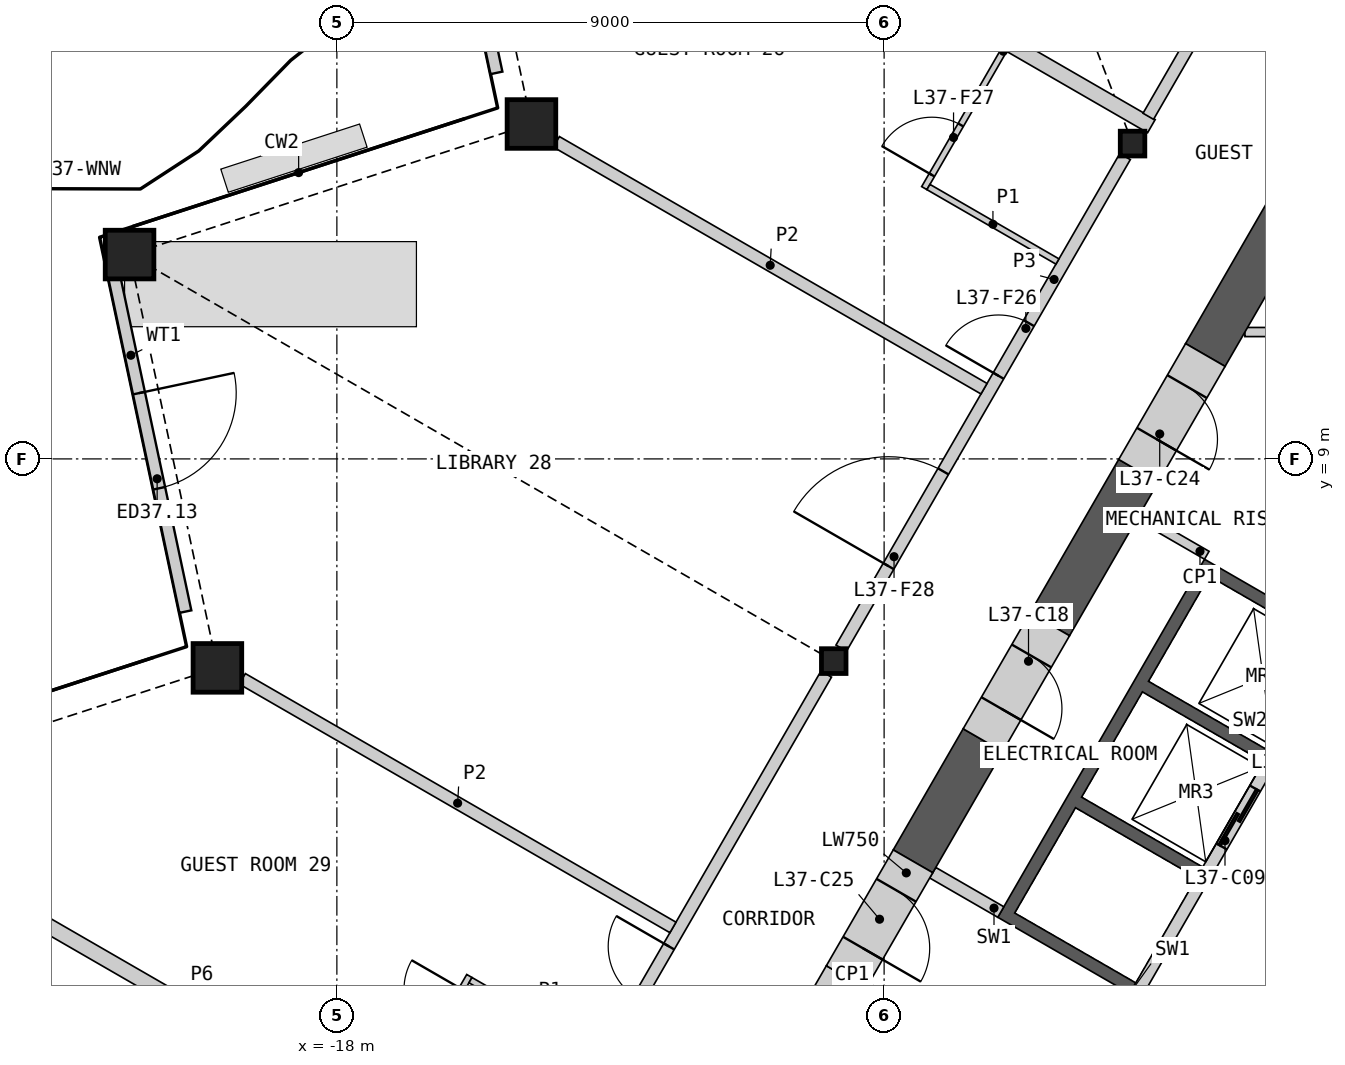
"""IFC4 building model, lengths in metres.
Left out: names, types, materials, properties, quantities, classifications, styles, units other than length and angle.
Written with IfcOpenShell. Run it as: python <this file> out.ifc"""

import sys

from ifc_helpers import new_model, si_unit, direction, frame, frame_2d, origin, origin_2d, place, context, subcontext, project, spatial, polyline, rectangle, hollow_rectangle, i_section, outline, extrude, element, fill, save


model = new_model("IFC4")
c1 = context("Model", 3, precision=1e-05, world=origin(), true_north=direction((0.0, 1.0)))
c2 = subcontext(c1, "Body", "Model", "MODEL_VIEW")
j1 = project(units=[si_unit("LENGTHUNIT", "METRE"), si_unit("PLANEANGLEUNIT", "RADIAN")], contexts=[c1])
p1 = place(None, origin())
s1 = spatial("IfcSite", under=j1, at=p1, CompositionType="ELEMENT")
p2 = place(p1, origin())
s2 = spatial("IfcBuilding", under=s1, at=p2, CompositionType="ELEMENT")
p3 = place(p2, frame((0.0, 0.0, 176.4)))
s3 = spatial("IfcBuildingStorey", under=s2, at=p3, CompositionType="ELEMENT", Elevation=176.4)
for number, where, z_axis, x_axis in (
    (1, (-14.8, 14.508, 0.0), (0.0, 0.0, 1.0), (1.0, 0.0, 0.0)),
    (2, (-21.409, 12.361, 0.0), (0.0, 0.0, 1.0), (1.0, 0.0, 0.0)),
    (3, (-19.965, 5.563, 0.0), (0.0, 0.0, 1.0), (1.0, 0.0, 0.0)),
):
    element("IfcColumn", number, at=place(p3, frame(where, z_axis=z_axis, x_axis=x_axis)), inside=s3, PredefinedType="COLUMN", context=c2, shape_type="SweptSolid", body=[
        extrude(hollow_rectangle(XDim=0.8, YDim=0.8, WallThickness=0.05, at=origin_2d()), origin(), (0.0, 0.0, 1.0), 3.6),
    ])
for number, where, z_axis, x_axis in (
    (4, (-4.914, 14.186, 0.0), (0.0, 0.0, 1.0), (1.0, 0.0, 0.0)),
    (5, (-9.828, 5.675, 0.0), (0.0, 0.0, 1.0), (1.0, 0.0, 0.0)),
):
    element("IfcColumn", number, at=place(p3, frame(where, z_axis=z_axis, x_axis=x_axis)), inside=s3, PredefinedType="COLUMN", context=c2, shape_type="SweptSolid", body=[
        extrude(i_section(OverallWidth=0.404, OverallDepth=0.407, WebThickness=0.027, FlangeThickness=0.044, at=origin_2d()), origin(), (0.0, 0.0, 1.0), 3.6),
    ])
p4 = place(p3, frame((-16.571, 20.971, 0.0), z_axis=(0.0, 0.0, 1.0), x_axis=(0.207872471739, -0.978155936184, 0.0)))
e6 = element("IfcWall", 6, at=p4, inside=s3, PredefinedType="SOLIDWALL", context=c2, shape_type="SweptSolid", body=[
    extrude(rectangle(XDim=5.748, YDim=0.2, at=frame_2d((2.874, 0.0))), origin(), (0.0, 0.0, 1.0), 2.701),
])
p5 = place(p4, frame((2.074, 0.0, 0.0)))
e7 = element("IfcOpeningElement", 7, at=p5, cuts=e6, PredefinedType="OPENING", context=c2, shape_type="SweptSolid", body=[
    extrude(rectangle(XDim=1.6, YDim=2.4, at=frame_2d((0.8, 1.2))), frame((0.0, 0.11, 0.0), z_axis=(0.0, -1.0, 0.0), x_axis=(1.0, 0.0, 0.0)), (0.0, 0.0, 1.0), 0.22),
])
p6 = place(p3, frame((-21.686, 12.111, 0.0), z_axis=(0.0, 0.0, 1.0), x_axis=(0.207872471739, -0.978155936184, 0.0)))
e8 = element("IfcWall", 8, at=p6, inside=s3, PredefinedType="SOLIDWALL", context=c2, shape_type="SweptSolid", body=[
    extrude(rectangle(XDim=5.748, YDim=0.2, at=frame_2d((2.874, 0.0))), origin(), (0.0, 0.0, 1.0), 2.701),
])
p7 = place(p6, frame((2.074, 0.0, 0.0)))
e9 = element("IfcOpeningElement", 9, at=p7, cuts=e8, PredefinedType="OPENING", context=c2, shape_type="SweptSolid", body=[
    extrude(rectangle(XDim=1.6, YDim=2.4, at=frame_2d((0.8, 1.2))), frame((0.0, 0.11, 0.0), z_axis=(0.0, -1.0, 0.0), x_axis=(1.0, 0.0, 0.0)), (0.0, 0.0, 1.0), 0.22),
])
p8 = place(p3, origin())
e10 = element("IfcWall", 10, at=p8, inside=s3, PredefinedType="SHEAR", context=c2, shape_type="SweptSolid", body=[
    extrude(outline(polyline([(-4.96, 0.208), (-7.131, 1.461), (-3.731, 7.35), (-1.561, 6.097), (-1.66, 5.924), (-3.652, 7.074), (-4.652, 5.342), (-2.66, 4.192), (-2.76, 4.019), (-4.752, 5.169), (-5.752, 3.437), (-3.76, 2.287), (-3.861, 2.113), (-5.852, 3.263), (-6.852, 1.531), (-4.861, 0.381), (-4.96, 0.208)])), origin(), (0.0, 0.0, 1.0), 3.25),
])
p9 = place(p3, frame((-1.631, 5.776, 0.0), z_axis=(0.0, 0.0, 1.0), x_axis=(-0.499992876559, -0.866029516466, 0.0)))
e11 = element("IfcWall", 11, at=p9, inside=s3, PredefinedType="SOLIDWALL", context=c2, shape_type="SweptSolid", body=[
    extrude(rectangle(XDim=6.486, YDim=0.2, at=frame_2d((3.243, 0.0))), origin(), (0.0, 0.0, 1.0), 3.25),
])
p10 = place(p9, frame((0.337, 0.0, 0.0)))
e12 = element("IfcOpeningElement", 12, at=p10, cuts=e11, PredefinedType="OPENING", context=c2, shape_type="SweptSolid", body=[
    extrude(rectangle(XDim=1.1, YDim=2.1, at=frame_2d((0.55, 1.05))), frame((0.0, 0.11, 0.0), z_axis=(0.0, -1.0, 0.0), x_axis=(1.0, 0.0, 0.0)), (0.0, 0.0, 1.0), 0.22),
])
p11 = place(p9, frame((2.537, 0.0, 0.0)))
e13 = element("IfcOpeningElement", 13, at=p11, cuts=e11, PredefinedType="OPENING", context=c2, shape_type="SweptSolid", body=[
    extrude(rectangle(XDim=1.1, YDim=2.1, at=frame_2d((0.55, 1.05))), frame((0.0, 0.11, 0.0), z_axis=(0.0, -1.0, 0.0), x_axis=(1.0, 0.0, 0.0)), (0.0, 0.0, 1.0), 0.22),
])
for number, where, z_axis, x_axis in (
    (14, (-7.081, 1.548, 0.0), (0.0, 0.0, 1.0), (-0.866, 0.5, 0.0)),
    (15, (-8.181, -0.357, 0.0), (0.0, 0.0, 1.0), (-0.866, 0.5, 0.0)),
):
    element("IfcWall", number, at=place(p3, frame(where, z_axis=z_axis, x_axis=x_axis)), inside=s3, PredefinedType="SHEAR", context=c2, shape_type="SweptSolid", body=[
        extrude(rectangle(XDim=1.293, YDim=0.2, at=frame_2d((0.646, 0.0))), origin(), (0.0, 0.0, 1.0), 3.25),
    ])
p12 = place(p3, frame((-3.693, 7.415, 0.0), z_axis=(0.0, 0.0, 1.0), x_axis=(-0.866003189247, 0.500038474733, 0.0)))
e16 = element("IfcWall", 16, at=p12, inside=s3, PredefinedType="PARTITIONING", context=c2, shape_type="SweptSolid", body=[
    extrude(rectangle(XDim=1.293, YDim=0.15, at=frame_2d((0.646, 0.0))), origin(), (0.0, 0.0, 1.0), 3.25),
])
p13 = place(p3, frame((-1.544, 11.087, 0.0), z_axis=(0.0, 0.0, 1.0), x_axis=(-1.0, 0.0, 0.0)))
e17 = element("IfcWall", 17, at=p13, inside=s3, PredefinedType="PARTITIONING", context=c2, shape_type="SweptSolid", body=[
    extrude(rectangle(XDim=1.522, YDim=0.15, at=frame_2d((0.761, 0.0))), origin(), (0.0, 0.0, 1.0), 3.25),
])
p14 = place(p3, frame((-0.325, 16.585, 0.0), z_axis=(0.0, 0.0, 1.0), x_axis=(-0.499993425452, -0.866029199568, 0.0)))
e18 = element("IfcWall", 18, at=p14, inside=s3, PredefinedType="SHEAR", context=c2, shape_type="SweptSolid", body=[
    extrude(rectangle(XDim=6.785, YDim=0.75, at=frame_2d((3.393, 0.0))), origin(), (0.0, 0.0, 1.0), 3.25),
])
p15 = place(p3, frame((-4.817, 8.804, 0.0), z_axis=(0.0, 0.0, 1.0), x_axis=(-0.500029273391, -0.866008502124, 0.0)))
e19 = element("IfcWall", 19, at=p15, inside=s3, PredefinedType="SHEAR", context=c2, shape_type="SweptSolid", body=[
    extrude(rectangle(XDim=2.916, YDim=0.75, at=frame_2d((1.458, 0.0))), origin(), (0.0, 0.0, 1.0), 3.25),
])
p16 = place(p3, frame((-7.375, 4.374, 0.0), z_axis=(0.0, 0.0, 1.0), x_axis=(-0.499952165731, -0.866053019151, 0.0)))
e20 = element("IfcWall", 20, at=p16, inside=s3, PredefinedType="SHEAR", context=c2, shape_type="SweptSolid", body=[
    extrude(rectangle(XDim=2.3, YDim=0.75, at=frame_2d((1.15, 0.0))), origin(), (0.0, 0.0, 1.0), 3.25),
])
p17 = place(p3, frame((-6.275, 6.279, 0.0), z_axis=(0.0, 0.0, 1.0), x_axis=(-0.499946605688, -0.86605622881, 0.0)))
e21 = element("IfcWall", 21, at=p17, inside=s3, PredefinedType="SHEAR", context=c2, shape_type="SweptSolid", body=[
    extrude(rectangle(XDim=2.2, YDim=0.75, at=frame_2d((1.1, 0.0))), origin(), (0.0, 0.0, 1.0), 3.25),
])
p18 = place(p17, frame((0.6, 0.0, 0.0)))
e22 = element("IfcOpeningElement", 22, at=p18, cuts=e21, PredefinedType="OPENING", context=c2, shape_type="SweptSolid", body=[
    extrude(rectangle(XDim=1.0, YDim=2.1, at=frame_2d((0.5, 1.05))), frame((0.0, 0.385, 0.0), z_axis=(0.0, -1.0, 0.0), x_axis=(1.0, 0.0, 0.0)), (0.0, 0.0, 1.0), 0.77),
])
p19 = place(p3, frame((-9.625, 0.477, 0.0), z_axis=(0.0, 0.0, 1.0), x_axis=(-0.499995718215, -0.86602787586, 0.0)))
e23 = element("IfcWall", 23, at=p19, inside=s3, PredefinedType="SHEAR", context=c2, shape_type="SweptSolid", body=[
    extrude(rectangle(XDim=3.016, YDim=0.75, at=frame_2d((1.508, 0.0))), origin(), (0.0, 0.0, 1.0), 3.25),
])
p20 = place(p19, frame((1.4, 0.0, 0.0)))
e24 = element("IfcOpeningElement", 24, at=p20, cuts=e23, PredefinedType="OPENING", context=c2, shape_type="SweptSolid", body=[
    extrude(rectangle(XDim=1.0, YDim=2.1, at=frame_2d((0.5, 1.05))), frame((0.0, 0.385, 0.0), z_axis=(0.0, -1.0, 0.0), x_axis=(1.0, 0.0, 0.0)), (0.0, 0.0, 1.0), 0.77),
])
p21 = place(p3, frame((-3.717, 10.709, 0.0), z_axis=(0.0, 0.0, 1.0), x_axis=(-0.50002983664, -0.866008176907, 0.0)))
e25 = element("IfcWall", 25, at=p21, inside=s3, PredefinedType="SHEAR", context=c2, shape_type="SweptSolid", body=[
    extrude(rectangle(XDim=2.2, YDim=0.75, at=frame_2d((1.1, 0.0))), origin(), (0.0, 0.0, 1.0), 3.25),
])
p22 = place(p21, frame((0.6, 0.0, 0.0)))
e26 = element("IfcOpeningElement", 26, at=p22, cuts=e25, PredefinedType="OPENING", context=c2, shape_type="SweptSolid", body=[
    extrude(rectangle(XDim=1.0, YDim=2.1, at=frame_2d((0.5, 1.05))), frame((0.0, 0.385, 0.0), z_axis=(0.0, -1.0, 0.0), x_axis=(1.0, 0.0, 0.0)), (0.0, 0.0, 1.0), 0.77),
])
p23 = place(p3, frame((-8.525, 2.382, 0.0), z_axis=(0.0, 0.0, 1.0), x_axis=(-0.500077893725, -0.86598042715, 0.0)))
e27 = element("IfcWall", 27, at=p23, inside=s3, PredefinedType="SHEAR", context=c2, shape_type="SweptSolid", body=[
    extrude(rectangle(XDim=2.2, YDim=0.75, at=frame_2d((1.1, 0.0))), origin(), (0.0, 0.0, 1.0), 3.25),
])
p24 = place(p23, frame((0.55, 0.0, 0.0)))
e28 = element("IfcOpeningElement", 28, at=p24, cuts=e27, PredefinedType="OPENING", context=c2, shape_type="SweptSolid", body=[
    extrude(rectangle(XDim=1.1, YDim=2.1, at=frame_2d((0.55, 1.05))), frame((0.0, 0.385, 0.0), z_axis=(0.0, -1.0, 0.0), x_axis=(1.0, 0.0, 0.0)), (0.0, 0.0, 1.0), 0.77),
])
p25 = place(p3, frame((-26.164, 3.292, 0.0), z_axis=(0.0, 0.0, 1.0), x_axis=(0.866022412254, -0.500005181446, 0.0)))
e29 = element("IfcWall", 29, at=p25, inside=s3, PredefinedType="PARTITIONING", context=c2, shape_type="SweptSolid", body=[
    extrude(rectangle(XDim=13.081, YDim=0.25, at=frame_2d((6.541, 0.0))), origin(), (0.0, 0.0, 1.0), 2.404),
])
p26 = place(p3, frame((-15.835, 20.956, 0.0), z_axis=(0.0, 0.0, 1.0), x_axis=(0.866029765546, -0.499992445131, 0.0)))
e30 = element("IfcWall", 30, at=p26, inside=s3, PredefinedType="PARTITIONING", context=c2, shape_type="SweptSolid", body=[
    extrude(rectangle(XDim=12.968, YDim=0.25, at=frame_2d((6.484, 0.0))), origin(), (0.0, 0.0, 1.0), 2.404),
])
p27 = place(p3, frame((-9.705, 5.888, 0.0), z_axis=(0.0, 0.0, 1.0), x_axis=(0.50000393355, 0.866023132736, 0.0)))
e31 = element("IfcWall", 31, at=p27, inside=s3, PredefinedType="PARTITIONING", context=c2, shape_type="SweptSolid", body=[
    extrude(rectangle(XDim=9.335, YDim=0.2, at=frame_2d((4.667, 0.0))), origin(), (0.0, 0.0, 1.0), 3.25),
])
p28 = place(p27, frame((5.172, 0.0, 0.0)))
e32 = element("IfcOpeningElement", 32, at=p28, cuts=e31, PredefinedType="OPENING", context=c2, shape_type="SweptSolid", body=[
    extrude(rectangle(XDim=1.0, YDim=2.1, at=frame_2d((0.5, 1.05))), frame((0.0, 0.11, 0.0), z_axis=(0.0, -1.0, 0.0), x_axis=(1.0, 0.0, 0.0)), (0.0, 0.0, 1.0), 0.22),
])
p29 = place(p27, frame((1.556, 0.0, 0.0)))
e33 = element("IfcOpeningElement", 33, at=p29, cuts=e31, PredefinedType="OPENING", context=c2, shape_type="SweptSolid", body=[
    extrude(rectangle(XDim=1.8, YDim=2.1, at=frame_2d((0.9, 1.05))), frame((0.0, 0.11, 0.0), z_axis=(0.0, -1.0, 0.0), x_axis=(1.0, 0.0, 0.0)), (0.0, 0.0, 1.0), 0.22),
])
p30 = place(p3, frame((-14.619, -2.624, 0.0), z_axis=(0.0, 0.0, 1.0), x_axis=(0.50000393355, 0.866023132736, 0.0)))
e34 = element("IfcWall", 34, at=p30, inside=s3, PredefinedType="PARTITIONING", context=c2, shape_type="SweptSolid", body=[
    extrude(rectangle(XDim=9.335, YDim=0.2, at=frame_2d((4.667, 0.0))), origin(), (0.0, 0.0, 1.0), 3.25),
])
p31 = place(p30, frame((3.163, 0.0, 0.0)))
e35 = element("IfcOpeningElement", 35, at=p31, cuts=e34, PredefinedType="OPENING", context=c2, shape_type="SweptSolid", body=[
    extrude(rectangle(XDim=1.0, YDim=2.1, at=frame_2d((0.5, 1.05))), frame((0.0, 0.11, 0.0), z_axis=(0.0, -1.0, 0.0), x_axis=(1.0, 0.0, 0.0)), (0.0, 0.0, 1.0), 0.22),
])
p32 = place(p3, frame((-4.655, 14.635, 0.0), z_axis=(0.0, 0.0, 1.0), x_axis=(0.499988331988, 0.866032140209, 0.0)))
e36 = element("IfcWall", 36, at=p32, inside=s3, PredefinedType="PARTITIONING", context=c2, shape_type="SweptSolid", body=[
    extrude(rectangle(XDim=5.485, YDim=0.2, at=frame_2d((2.742, 0.0))), origin(), (0.0, 0.0, 1.0), 3.25),
])
p33 = place(p32, frame((4.032, 0.0, 0.0)))
e37 = element("IfcOpeningElement", 37, at=p33, cuts=e36, PredefinedType="OPENING", context=c2, shape_type="SweptSolid", body=[
    extrude(rectangle(XDim=1.1, YDim=2.1, at=frame_2d((0.55, 1.05))), frame((0.0, 0.11, 0.0), z_axis=(0.0, -1.0, 0.0), x_axis=(1.0, 0.0, 0.0)), (0.0, 0.0, 1.0), 0.22),
])
p34 = place(p3, frame((-19.555, 5.383, 0.0), z_axis=(0.0, 0.0, 1.0), x_axis=(0.866027979776, -0.499995538225, 0.0)))
e38 = element("IfcWall", 38, at=p34, inside=s3, PredefinedType="PARTITIONING", context=c2, shape_type="SweptSolid", body=[
    extrude(rectangle(XDim=8.177, YDim=0.2, at=frame_2d((4.089, 0.0))), origin(), (0.0, 0.0, 1.0), 2.404),
])
p35 = place(p3, frame((-14.39, 14.215, 0.0), z_axis=(0.0, 0.0, 1.0), x_axis=(0.86602738064, -0.499996575971, 0.0)))
e39 = element("IfcWall", 39, at=p35, inside=s3, PredefinedType="PARTITIONING", context=c2, shape_type="SweptSolid", body=[
    extrude(rectangle(XDim=8.121, YDim=0.2, at=frame_2d((4.06, 0.0))), origin(), (0.0, 0.0, 1.0), 2.404),
])
p36 = place(p3, frame((-18.421, -4.008, 0.0), z_axis=(0.0, 0.0, 1.0), x_axis=(0.500006934395, 0.866021400173, 0.0)))
e40 = element("IfcWall", 40, at=p36, inside=s3, PredefinedType="PARTITIONING", context=c2, shape_type="SweptSolid", body=[
    extrude(rectangle(XDim=5.2, YDim=0.1, at=frame_2d((2.6, 0.0))), origin(), (0.0, 0.0, 1.0), 2.404),
])
p37 = place(p36, frame((4.0, 0.0, 0.0)))
e41 = element("IfcOpeningElement", 41, at=p37, cuts=e40, PredefinedType="OPENING", context=c2, shape_type="SweptSolid", body=[
    extrude(rectangle(XDim=0.95, YDim=2.1, at=frame_2d((0.475, 1.05))), frame((0.0, 0.06, 0.0), z_axis=(0.0, -1.0, 0.0), x_axis=(1.0, 0.0, 0.0)), (0.0, 0.0, 1.0), 0.12),
])
p38 = place(p36, frame((0.25, 0.0, 0.0)))
e42 = element("IfcOpeningElement", 42, at=p38, cuts=e40, PredefinedType="OPENING", context=c2, shape_type="SweptSolid", body=[
    extrude(rectangle(XDim=0.95, YDim=2.1, at=frame_2d((0.475, 1.05))), frame((0.0, 0.06, 0.0), z_axis=(0.0, -1.0, 0.0), x_axis=(1.0, 0.0, 0.0)), (0.0, 0.0, 1.0), 0.12),
])
p39 = place(p3, frame((-8.339, 13.454, 0.0), z_axis=(0.0, 0.0, 1.0), x_axis=(0.499992051641, 0.866029992723, 0.0)))
e43 = element("IfcWall", 43, at=p39, inside=s3, PredefinedType="PARTITIONING", context=c2, shape_type="SweptSolid", body=[
    extrude(rectangle(XDim=5.2, YDim=0.1, at=frame_2d((2.6, 0.0))), origin(), (0.0, 0.0, 1.0), 2.404),
])
p40 = place(p39, frame((4.0, 0.0, 0.0)))
e44 = element("IfcOpeningElement", 44, at=p40, cuts=e43, PredefinedType="OPENING", context=c2, shape_type="SweptSolid", body=[
    extrude(rectangle(XDim=0.95, YDim=2.1, at=frame_2d((0.475, 1.05))), frame((0.0, 0.06, 0.0), z_axis=(0.0, -1.0, 0.0), x_axis=(1.0, 0.0, 0.0)), (0.0, 0.0, 1.0), 0.12),
])
p41 = place(p39, frame((0.25, 0.0, 0.0)))
e45 = element("IfcOpeningElement", 45, at=p41, cuts=e43, PredefinedType="OPENING", context=c2, shape_type="SweptSolid", body=[
    extrude(rectangle(XDim=0.95, YDim=2.1, at=frame_2d((0.475, 1.05))), frame((0.0, 0.06, 0.0), z_axis=(0.0, -1.0, 0.0), x_axis=(1.0, 0.0, 0.0)), (0.0, 0.0, 1.0), 0.12),
])
p42 = place(p3, frame((-15.802, 0.427, 0.0), z_axis=(0.0, 0.0, 1.0), x_axis=(0.866032905446, -0.499987006516, 0.0)))
e46 = element("IfcWall", 46, at=p42, inside=s3, PredefinedType="PARTITIONING", context=c2, shape_type="SweptSolid", body=[
    extrude(rectangle(XDim=2.45, YDim=0.1, at=frame_2d((1.225, 0.0))), origin(), (0.0, 0.0, 1.0), 2.404),
])
p43 = place(p3, frame((-8.271, 13.472, 0.0), z_axis=(0.0, 0.0, 1.0), x_axis=(0.865989751695, -0.500061746146, 0.0)))
e47 = element("IfcWall", 47, at=p43, inside=s3, PredefinedType="PARTITIONING", context=c2, shape_type="SweptSolid", body=[
    extrude(rectangle(XDim=2.45, YDim=0.1, at=frame_2d((1.225, 0.0))), origin(), (0.0, 0.0, 1.0), 2.404),
])
p44 = place(p7, origin())
e48 = element("IfcDoor", 48, at=p44, inside=s3, OperationType="DOUBLE_DOOR_SINGLE_SWING", PredefinedType="DOOR", context=c2, shape_type="SweptSolid", body=[
    extrude(rectangle(XDim=1.6, YDim=2.4, at=frame_2d((0.8, 1.2))), frame((0.0, 0.025, 0.0), z_axis=(0.0, -1.0, 0.0), x_axis=(1.0, 0.0, 0.0)), (0.0, 0.0, 1.0), 0.05),
])
fill(e9, e48)
p45 = place(p11, origin())
e49 = element("IfcDoor", 49, at=p45, inside=s3, OperationType="SLIDING_TO_LEFT", PredefinedType="DOOR", context=c2, shape_type="SweptSolid", body=[
    extrude(rectangle(XDim=1.1, YDim=2.1, at=frame_2d((0.55, 1.05))), frame((0.0, 0.025, 0.0), z_axis=(0.0, -1.0, 0.0), x_axis=(1.0, 0.0, 0.0)), (0.0, 0.0, 1.0), 0.05),
])
fill(e13, e49)
p46 = place(p18, origin())
e50 = element("IfcDoor", 50, at=p46, inside=s3, OperationType="SINGLE_SWING_RIGHT", PredefinedType="DOOR", context=c2, shape_type="SweptSolid", body=[
    extrude(rectangle(XDim=1.0, YDim=2.1, at=frame_2d((0.5, 1.05))), frame((0.0, 0.13, 0.0), z_axis=(0.0, -1.0, 0.0), x_axis=(1.0, 0.0, 0.0)), (0.0, 0.0, 1.0), 0.05),
])
fill(e22, e50)
p47 = place(p22, origin())
e51 = element("IfcDoor", 51, at=p47, inside=s3, OperationType="SINGLE_SWING_RIGHT", PredefinedType="DOOR", context=c2, shape_type="SweptSolid", body=[
    extrude(rectangle(XDim=1.0, YDim=2.1, at=frame_2d((0.5, 1.05))), frame((0.0, 0.13, 0.0), z_axis=(0.0, -1.0, 0.0), x_axis=(1.0, 0.0, 0.0)), (0.0, 0.0, 1.0), 0.05),
])
fill(e26, e51)
p48 = place(p24, origin())
e52 = element("IfcDoor", 52, at=p48, inside=s3, OperationType="SINGLE_SWING_RIGHT", PredefinedType="DOOR", context=c2, shape_type="SweptSolid", body=[
    extrude(rectangle(XDim=1.1, YDim=2.1, at=frame_2d((0.55, 1.05))), frame((0.0, 0.13, 0.0), z_axis=(0.0, -1.0, 0.0), x_axis=(1.0, 0.0, 0.0)), (0.0, 0.0, 1.0), 0.05),
])
fill(e28, e52)
p49 = place(p28, origin())
e53 = element("IfcDoor", 53, at=p49, inside=s3, OperationType="SINGLE_SWING_LEFT", PredefinedType="DOOR", context=c2, shape_type="SweptSolid", body=[
    extrude(rectangle(XDim=1.0, YDim=2.1, at=frame_2d((0.5, 1.05))), frame((0.0, 0.025, 0.0), z_axis=(0.0, -1.0, 0.0), x_axis=(1.0, 0.0, 0.0)), (0.0, 0.0, 1.0), 0.05),
])
fill(e32, e53)
p50 = place(p41, origin())
e54 = element("IfcDoor", 54, at=p50, inside=s3, OperationType="SINGLE_SWING_LEFT", PredefinedType="DOOR", context=c2, shape_type="SweptSolid", body=[
    extrude(rectangle(XDim=0.95, YDim=2.1, at=frame_2d((0.475, 1.05))), frame((0.0, 0.025, 0.0), z_axis=(0.0, -1.0, 0.0), x_axis=(1.0, 0.0, 0.0)), (0.0, 0.0, 1.0), 0.05),
])
fill(e45, e54)
p51 = place(p29, origin())
e55 = element("IfcDoor", 55, at=p51, inside=s3, OperationType="DOUBLE_DOOR_SINGLE_SWING", PredefinedType="DOOR", context=c2, shape_type="SweptSolid", body=[
    extrude(rectangle(XDim=1.8, YDim=2.1, at=frame_2d((0.9, 1.05))), frame((0.0, 0.025, 0.0), z_axis=(0.0, -1.0, 0.0), x_axis=(1.0, 0.0, 0.0)), (0.0, 0.0, 1.0), 0.05),
])
fill(e33, e55)
p52 = place(p31, origin())
e56 = element("IfcDoor", 56, at=p52, inside=s3, OperationType="SINGLE_SWING_RIGHT", PredefinedType="DOOR", context=c2, shape_type="SweptSolid", body=[
    extrude(rectangle(XDim=1.0, YDim=2.1, at=frame_2d((0.5, 1.05))), frame((0.0, 0.025, 0.0), z_axis=(0.0, -1.0, 0.0), x_axis=(1.0, 0.0, 0.0)), (0.0, 0.0, 1.0), 0.05),
])
fill(e35, e56)
save(model, sys.argv[1])
